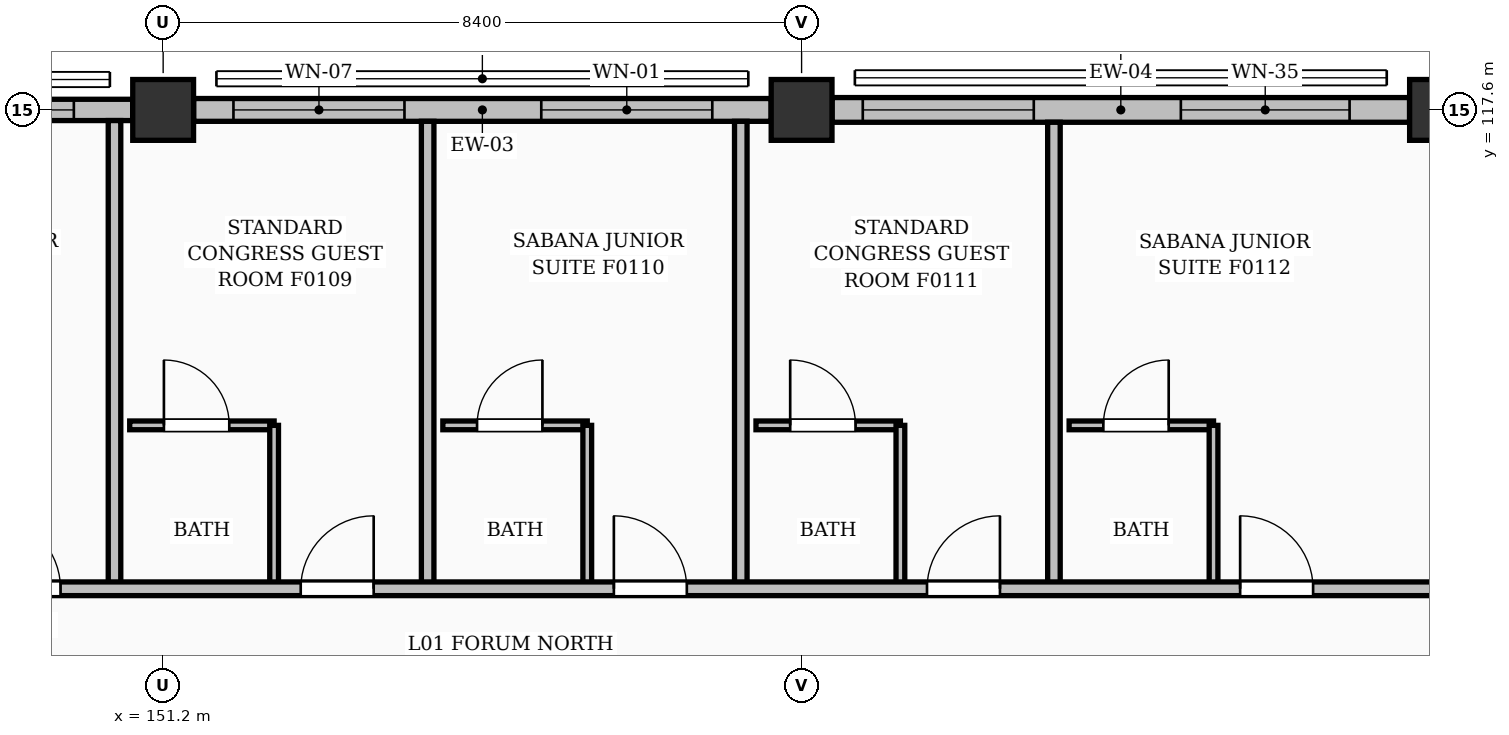
"""IFC4 building model, lengths in metres.
Left out: names, types, materials, properties, quantities, classifications, styles, units other than length and angle.
Written with IfcOpenShell. Run it as: python <this file> out.ifc"""

import sys

from ifc_helpers import new_model, si_unit, direction, frame, frame_2d, origin, origin_2d, place, context, subcontext, project, spatial, rectangle, extrude, element, fill, save


model = new_model("IFC4")
c1 = context("Model", 3, precision=1e-05, world=origin(), true_north=direction((0.0, 1.0)))
c2 = subcontext(c1, "Body", "Model", "MODEL_VIEW")
j1 = project(units=[si_unit("LENGTHUNIT", "METRE"), si_unit("PLANEANGLEUNIT", "RADIAN")], contexts=[c1])
p1 = place(None, origin())
s1 = spatial("IfcSite", under=j1, at=p1, CompositionType="ELEMENT")
p2 = place(p1, origin())
s2 = spatial("IfcBuilding", under=s1, at=p2, CompositionType="ELEMENT")
p3 = place(p2, frame((0.0, 0.0, 3.92)))
s3 = spatial("IfcBuildingStorey", under=s2, at=p3, CompositionType="ELEMENT", Elevation=3.92)
for number, where, z_axis, x_axis in (
    (1, (151.2, 117.6, 0.0), (0.0, 0.0, 1.0), (1.0, 0.0, 0.0)),
    (2, (159.6, 117.6, 0.0), (0.0, 0.0, 1.0), (1.0, 0.0, 0.0)),
    (3, (168.0, 117.6, 0.0), (0.0, 0.0, 1.0), (1.0, 0.0, 0.0)),
):
    element("IfcColumn", number, at=place(p3, frame(where, z_axis=z_axis, x_axis=x_axis)), inside=s3, PredefinedType="COLUMN", context=c2, shape_type="SweptSolid", body=[
        extrude(rectangle(XDim=0.8, YDim=0.8, at=origin_2d()), origin(), (0.0, 0.0, 1.0), 3.64),
    ])
p4 = place(p3, frame((143.201, 117.6, 0.0), z_axis=(0.0, 0.0, 1.0), x_axis=(1.0, 0.0, 0.0)))
e4 = element("IfcWall", 4, at=p4, inside=s3, PredefinedType="SOLIDWALL", context=c2, shape_type="SweptSolid", body=[
    extrude(rectangle(XDim=7.598, YDim=0.28, at=frame_2d((3.799, 0.0))), origin(), (0.0, 0.0, 1.0), 2.445),
])
p5 = place(p4, frame((0.539, 0.0, 0.25)))
e5 = element("IfcOpeningElement", 5, at=p5, cuts=e4, PredefinedType="OPENING", context=c2, shape_type="SweptSolid", body=[
    extrude(rectangle(XDim=2.22, YDim=1.9, at=frame_2d((1.11, 0.95))), frame((0.0, 0.15, 0.0), z_axis=(0.0, -1.0, 0.0), x_axis=(1.0, 0.0, 0.0)), (0.0, 0.0, 1.0), 0.3),
])
p6 = place(p4, frame((4.574, 0.0, 0.25)))
e6 = element("IfcOpeningElement", 6, at=p6, cuts=e4, PredefinedType="OPENING", context=c2, shape_type="SweptSolid", body=[
    extrude(rectangle(XDim=2.25, YDim=1.95, at=frame_2d((1.125, 0.975))), frame((0.0, 0.15, 0.0), z_axis=(0.0, -1.0, 0.0), x_axis=(1.0, 0.0, 0.0)), (0.0, 0.0, 1.0), 0.3),
])
p7 = place(p3, frame((151.601, 117.6, 0.0), z_axis=(0.0, 0.0, 1.0), x_axis=(1.0, 0.0, 0.0)))
e7 = element("IfcWall", 7, at=p7, inside=s3, PredefinedType="SOLIDWALL", context=c2, shape_type="SweptSolid", body=[
    extrude(rectangle(XDim=7.598, YDim=0.3, at=frame_2d((3.799, 0.0))), origin(), (0.0, 0.0, 1.0), 2.445),
])
p8 = place(p7, frame((0.524, 0.0, 0.25)))
e8 = element("IfcOpeningElement", 8, at=p8, cuts=e7, PredefinedType="OPENING", context=c2, shape_type="SweptSolid", body=[
    extrude(rectangle(XDim=2.25, YDim=1.95, at=frame_2d((1.125, 0.975))), frame((0.0, 0.16, 0.0), z_axis=(0.0, -1.0, 0.0), x_axis=(1.0, 0.0, 0.0)), (0.0, 0.0, 1.0), 0.32),
])
p9 = place(p7, frame((4.574, 0.0, 0.25)))
e9 = element("IfcOpeningElement", 9, at=p9, cuts=e7, PredefinedType="OPENING", context=c2, shape_type="SweptSolid", body=[
    extrude(rectangle(XDim=2.25, YDim=1.85, at=frame_2d((1.125, 0.925))), frame((0.0, 0.16, 0.0), z_axis=(0.0, -1.0, 0.0), x_axis=(1.0, 0.0, 0.0)), (0.0, 0.0, 1.0), 0.32),
])
p10 = place(p3, frame((160.001, 117.6, 0.0), z_axis=(0.0, 0.0, 1.0), x_axis=(1.0, 0.0, 0.0)))
e10 = element("IfcWall", 10, at=p10, inside=s3, PredefinedType="SOLIDWALL", context=c2, shape_type="SweptSolid", body=[
    extrude(rectangle(XDim=7.598, YDim=0.325, at=frame_2d((3.799, 0.0))), origin(), (0.0, 0.0, 1.0), 2.445),
])
p11 = place(p10, frame((0.404, 0.0, 0.25)))
e11 = element("IfcOpeningElement", 11, at=p11, cuts=e10, PredefinedType="OPENING", context=c2, shape_type="SweptSolid", body=[
    extrude(rectangle(XDim=2.25, YDim=1.85, at=frame_2d((1.125, 0.925))), frame((0.0, 0.172, 0.0), z_axis=(0.0, -1.0, 0.0), x_axis=(1.0, 0.0, 0.0)), (0.0, 0.0, 1.0), 0.345),
])
p12 = place(p10, frame((4.589, 0.0, 0.25)))
e12 = element("IfcOpeningElement", 12, at=p12, cuts=e10, PredefinedType="OPENING", context=c2, shape_type="SweptSolid", body=[
    extrude(rectangle(XDim=2.22, YDim=1.9, at=frame_2d((1.11, 0.95))), frame((0.0, 0.172, 0.0), z_axis=(0.0, -1.0, 0.0), x_axis=(1.0, 0.0, 0.0)), (0.0, 0.0, 1.0), 0.345),
])
p13 = place(p3, frame((150.76, 113.45, 0.0), z_axis=(0.0, 0.0, 1.0), x_axis=(1.0, 0.0, 0.0)))
e13 = element("IfcWall", 13, at=p13, inside=s3, PredefinedType="PARTITIONING", context=c2, shape_type="SweptSolid", body=[
    extrude(rectangle(XDim=1.9, YDim=0.115, at=frame_2d((0.95, 0.0))), origin(), (0.0, 0.0, 1.0), 3.36),
])
p14 = place(p13, frame((0.45, 0.0, 0.0)))
e14 = element("IfcOpeningElement", 14, at=p14, cuts=e13, PredefinedType="OPENING", context=c2, shape_type="SweptSolid", body=[
    extrude(rectangle(XDim=0.86, YDim=2.05, at=frame_2d((0.43, 1.025))), frame((0.0, 0.067, 0.0), z_axis=(0.0, -1.0, 0.0), x_axis=(1.0, 0.0, 0.0)), (0.0, 0.0, 1.0), 0.135),
])
p15 = place(p3, frame((152.66, 111.3, 0.0), z_axis=(0.0, 0.0, 1.0), x_axis=(0.0, 1.0, 0.0)))
e15 = element("IfcWall", 15, at=p15, inside=s3, PredefinedType="PARTITIONING", context=c2, shape_type="SweptSolid", body=[
    extrude(rectangle(XDim=2.15, YDim=0.115, at=frame_2d((1.075, 0.0))), origin(), (0.0, 0.0, 1.0), 3.36),
])
p16 = place(p3, frame((150.56, 111.3, 0.0), z_axis=(0.0, 0.0, 1.0), x_axis=(0.0, 1.0, 0.0)))
e16 = element("IfcWall", 16, at=p16, inside=s3, PredefinedType="PARTITIONING", context=c2, shape_type="SweptSolid", body=[
    extrude(rectangle(XDim=6.16, YDim=0.165, at=frame_2d((3.08, 0.0))), origin(), (0.0, 0.0, 1.0), 3.36),
])
p17 = place(p3, frame((154.88, 113.45, 0.0), z_axis=(0.0, 0.0, 1.0), x_axis=(1.0, 0.0, 0.0)))
e17 = element("IfcWall", 17, at=p17, inside=s3, PredefinedType="PARTITIONING", context=c2, shape_type="SweptSolid", body=[
    extrude(rectangle(XDim=1.9, YDim=0.115, at=frame_2d((0.95, 0.0))), origin(), (0.0, 0.0, 1.0), 3.36),
])
p18 = place(p17, frame((0.45, 0.0, 0.0)))
e18 = element("IfcOpeningElement", 18, at=p18, cuts=e17, PredefinedType="OPENING", context=c2, shape_type="SweptSolid", body=[
    extrude(rectangle(XDim=0.86, YDim=2.05, at=frame_2d((0.43, 1.025))), frame((0.0, 0.067, 0.0), z_axis=(0.0, -1.0, 0.0), x_axis=(1.0, 0.0, 0.0)), (0.0, 0.0, 1.0), 0.135),
])
p19 = place(p3, frame((156.78, 111.3, 0.0), z_axis=(0.0, 0.0, 1.0), x_axis=(0.0, 1.0, 0.0)))
e19 = element("IfcWall", 19, at=p19, inside=s3, PredefinedType="PARTITIONING", context=c2, shape_type="SweptSolid", body=[
    extrude(rectangle(XDim=2.15, YDim=0.115, at=frame_2d((1.075, 0.0))), origin(), (0.0, 0.0, 1.0), 3.042),
])
p20 = place(p3, frame((154.68, 111.3, 0.0), z_axis=(0.0, 0.0, 1.0), x_axis=(0.0, 1.0, 0.0)))
e20 = element("IfcWall", 20, at=p20, inside=s3, PredefinedType="PARTITIONING", context=c2, shape_type="SweptSolid", body=[
    extrude(rectangle(XDim=6.15, YDim=0.165, at=frame_2d((3.075, 0.0))), origin(), (0.0, 0.0, 1.0), 3.36),
])
p21 = place(p3, frame((159.0, 113.45, 0.0), z_axis=(0.0, 0.0, 1.0), x_axis=(1.0, 0.0, 0.0)))
e21 = element("IfcWall", 21, at=p21, inside=s3, PredefinedType="PARTITIONING", context=c2, shape_type="SweptSolid", body=[
    extrude(rectangle(XDim=1.9, YDim=0.115, at=frame_2d((0.95, 0.0))), origin(), (0.0, 0.0, 1.0), 3.36),
])
p22 = place(p21, frame((0.45, 0.0, 0.0)))
e22 = element("IfcOpeningElement", 22, at=p22, cuts=e21, PredefinedType="OPENING", context=c2, shape_type="SweptSolid", body=[
    extrude(rectangle(XDim=0.86, YDim=2.05, at=frame_2d((0.43, 1.025))), frame((0.0, 0.067, 0.0), z_axis=(0.0, -1.0, 0.0), x_axis=(1.0, 0.0, 0.0)), (0.0, 0.0, 1.0), 0.135),
])
p23 = place(p3, frame((160.9, 111.3, 0.0), z_axis=(0.0, 0.0, 1.0), x_axis=(0.0, 1.0, 0.0)))
e23 = element("IfcWall", 23, at=p23, inside=s3, PredefinedType="PARTITIONING", context=c2, shape_type="SweptSolid", body=[
    extrude(rectangle(XDim=2.15, YDim=0.115, at=frame_2d((1.075, 0.0))), origin(), (0.0, 0.0, 1.0), 3.36),
])
p24 = place(p3, frame((158.8, 111.3, 0.0), z_axis=(0.0, 0.0, 1.0), x_axis=(0.0, 1.0, 0.0)))
e24 = element("IfcWall", 24, at=p24, inside=s3, PredefinedType="PARTITIONING", context=c2, shape_type="SweptSolid", body=[
    extrude(rectangle(XDim=6.15, YDim=0.165, at=frame_2d((3.075, 0.0))), origin(), (0.0, 0.0, 1.0), 3.36),
])
p25 = place(p3, frame((163.12, 113.45, 0.0), z_axis=(0.0, 0.0, 1.0), x_axis=(1.0, 0.0, 0.0)))
e25 = element("IfcWall", 25, at=p25, inside=s3, PredefinedType="PARTITIONING", context=c2, shape_type="SweptSolid", body=[
    extrude(rectangle(XDim=1.9, YDim=0.115, at=frame_2d((0.95, 0.0))), origin(), (0.0, 0.0, 1.0), 3.36),
])
p26 = place(p25, frame((0.45, 0.0, 0.0)))
e26 = element("IfcOpeningElement", 26, at=p26, cuts=e25, PredefinedType="OPENING", context=c2, shape_type="SweptSolid", body=[
    extrude(rectangle(XDim=0.86, YDim=2.05, at=frame_2d((0.43, 1.025))), frame((0.0, 0.067, 0.0), z_axis=(0.0, -1.0, 0.0), x_axis=(1.0, 0.0, 0.0)), (0.0, 0.0, 1.0), 0.135),
])
p27 = place(p3, frame((165.02, 111.3, 0.0), z_axis=(0.0, 0.0, 1.0), x_axis=(0.0, 1.0, 0.0)))
e27 = element("IfcWall", 27, at=p27, inside=s3, PredefinedType="PARTITIONING", context=c2, shape_type="SweptSolid", body=[
    extrude(rectangle(XDim=2.15, YDim=0.115, at=frame_2d((1.075, 0.0))), origin(), (0.0, 0.0, 1.0), 3.36),
])
p28 = place(p3, frame((162.92, 111.3, 0.0), z_axis=(0.0, 0.0, 1.0), x_axis=(0.0, 1.0, 0.0)))
e28 = element("IfcWall", 28, at=p28, inside=s3, PredefinedType="PARTITIONING", context=c2, shape_type="SweptSolid", body=[
    extrude(rectangle(XDim=6.137, YDim=0.165, at=frame_2d((3.069, 0.0))), origin(), (0.0, 0.0, 1.0), 3.36),
])
p29 = place(p3, frame((117.6, 111.3, 0.0), z_axis=(0.0, 0.0, 1.0), x_axis=(1.0, 0.0, 0.0)))
e29 = element("IfcWall", 29, at=p29, inside=s3, PredefinedType="PARTITIONING", context=c2, shape_type="SweptSolid", body=[
    extrude(rectangle(XDim=50.32, YDim=0.18, at=frame_2d((25.16, 0.0))), origin(), (0.0, 0.0, 1.0), 3.36),
])
p30 = place(p29, frame((2.45, 0.0, 0.0)))
e30 = element("IfcOpeningElement", 30, at=p30, cuts=e29, PredefinedType="OPENING", context=c2, shape_type="SweptSolid", body=[
    extrude(rectangle(XDim=0.96, YDim=2.15, at=frame_2d((0.48, 1.075))), frame((0.0, 0.1, 0.0), z_axis=(0.0, -1.0, 0.0), x_axis=(1.0, 0.0, 0.0)), (0.0, 0.0, 1.0), 0.2),
])
p31 = place(p29, frame((6.57, 0.0, 0.0)))
e31 = element("IfcOpeningElement", 31, at=p31, cuts=e29, PredefinedType="OPENING", context=c2, shape_type="SweptSolid", body=[
    extrude(rectangle(XDim=0.96, YDim=2.15, at=frame_2d((0.48, 1.075))), frame((0.0, 0.1, 0.0), z_axis=(0.0, -1.0, 0.0), x_axis=(1.0, 0.0, 0.0)), (0.0, 0.0, 1.0), 0.2),
])
p32 = place(p29, frame((10.69, 0.0, 0.0)))
e32 = element("IfcOpeningElement", 32, at=p32, cuts=e29, PredefinedType="OPENING", context=c2, shape_type="SweptSolid", body=[
    extrude(rectangle(XDim=0.96, YDim=2.15, at=frame_2d((0.48, 1.075))), frame((0.0, 0.1, 0.0), z_axis=(0.0, -1.0, 0.0), x_axis=(1.0, 0.0, 0.0)), (0.0, 0.0, 1.0), 0.2),
])
p33 = place(p29, frame((14.81, 0.0, 0.0)))
e33 = element("IfcOpeningElement", 33, at=p33, cuts=e29, PredefinedType="OPENING", context=c2, shape_type="SweptSolid", body=[
    extrude(rectangle(XDim=0.96, YDim=2.15, at=frame_2d((0.48, 1.075))), frame((0.0, 0.1, 0.0), z_axis=(0.0, -1.0, 0.0), x_axis=(1.0, 0.0, 0.0)), (0.0, 0.0, 1.0), 0.2),
])
p34 = place(p29, frame((18.93, 0.0, 0.0)))
e34 = element("IfcOpeningElement", 34, at=p34, cuts=e29, PredefinedType="OPENING", context=c2, shape_type="SweptSolid", body=[
    extrude(rectangle(XDim=0.96, YDim=2.15, at=frame_2d((0.48, 1.075))), frame((0.0, 0.1, 0.0), z_axis=(0.0, -1.0, 0.0), x_axis=(1.0, 0.0, 0.0)), (0.0, 0.0, 1.0), 0.2),
])
p35 = place(p29, frame((23.05, 0.0, 0.0)))
e35 = element("IfcOpeningElement", 35, at=p35, cuts=e29, PredefinedType="OPENING", context=c2, shape_type="SweptSolid", body=[
    extrude(rectangle(XDim=0.96, YDim=2.15, at=frame_2d((0.48, 1.075))), frame((0.0, 0.1, 0.0), z_axis=(0.0, -1.0, 0.0), x_axis=(1.0, 0.0, 0.0)), (0.0, 0.0, 1.0), 0.2),
])
p36 = place(p29, frame((27.17, 0.0, 0.0)))
e36 = element("IfcOpeningElement", 36, at=p36, cuts=e29, PredefinedType="OPENING", context=c2, shape_type="SweptSolid", body=[
    extrude(rectangle(XDim=0.96, YDim=2.15, at=frame_2d((0.48, 1.075))), frame((0.0, 0.1, 0.0), z_axis=(0.0, -1.0, 0.0), x_axis=(1.0, 0.0, 0.0)), (0.0, 0.0, 1.0), 0.2),
])
p37 = place(p29, frame((31.29, 0.0, 0.0)))
e37 = element("IfcOpeningElement", 37, at=p37, cuts=e29, PredefinedType="OPENING", context=c2, shape_type="SweptSolid", body=[
    extrude(rectangle(XDim=0.96, YDim=2.15, at=frame_2d((0.48, 1.075))), frame((0.0, 0.1, 0.0), z_axis=(0.0, -1.0, 0.0), x_axis=(1.0, 0.0, 0.0)), (0.0, 0.0, 1.0), 0.2),
])
p38 = place(p29, frame((35.41, 0.0, 0.0)))
e38 = element("IfcOpeningElement", 38, at=p38, cuts=e29, PredefinedType="OPENING", context=c2, shape_type="SweptSolid", body=[
    extrude(rectangle(XDim=0.96, YDim=2.15, at=frame_2d((0.48, 1.075))), frame((0.0, 0.1, 0.0), z_axis=(0.0, -1.0, 0.0), x_axis=(1.0, 0.0, 0.0)), (0.0, 0.0, 1.0), 0.2),
])
p39 = place(p29, frame((39.53, 0.0, 0.0)))
e39 = element("IfcOpeningElement", 39, at=p39, cuts=e29, PredefinedType="OPENING", context=c2, shape_type="SweptSolid", body=[
    extrude(rectangle(XDim=0.96, YDim=2.15, at=frame_2d((0.48, 1.075))), frame((0.0, 0.1, 0.0), z_axis=(0.0, -1.0, 0.0), x_axis=(1.0, 0.0, 0.0)), (0.0, 0.0, 1.0), 0.2),
])
p40 = place(p29, frame((43.65, 0.0, 0.0)))
e40 = element("IfcOpeningElement", 40, at=p40, cuts=e29, PredefinedType="OPENING", context=c2, shape_type="SweptSolid", body=[
    extrude(rectangle(XDim=0.96, YDim=2.15, at=frame_2d((0.48, 1.075))), frame((0.0, 0.1, 0.0), z_axis=(0.0, -1.0, 0.0), x_axis=(1.0, 0.0, 0.0)), (0.0, 0.0, 1.0), 0.2),
])
p41 = place(p29, frame((47.77, 0.0, 0.0)))
e41 = element("IfcOpeningElement", 41, at=p41, cuts=e29, PredefinedType="OPENING", context=c2, shape_type="SweptSolid", body=[
    extrude(rectangle(XDim=0.96, YDim=2.15, at=frame_2d((0.48, 1.075))), frame((0.0, 0.1, 0.0), z_axis=(0.0, -1.0, 0.0), x_axis=(1.0, 0.0, 0.0)), (0.0, 0.0, 1.0), 0.2),
])
p42 = place(p6, origin())
e42 = element("IfcWindow", 42, at=p42, inside=s3, PartitioningType="DOUBLE_PANEL_VERTICAL", PredefinedType="WINDOW", context=c2, shape_type="SweptSolid", body=[
    extrude(rectangle(XDim=2.25, YDim=1.95, at=frame_2d((1.125, 0.975))), frame((0.0, 0.03, 0.0), z_axis=(0.0, -1.0, 0.0), x_axis=(1.0, 0.0, 0.0)), (0.0, 0.0, 1.0), 0.06),
])
fill(e6, e42)
p43 = place(p8, origin())
e43 = element("IfcWindow", 43, at=p43, inside=s3, PartitioningType="DOUBLE_PANEL_VERTICAL", PredefinedType="WINDOW", context=c2, shape_type="SweptSolid", body=[
    extrude(rectangle(XDim=2.25, YDim=1.95, at=frame_2d((1.125, 0.975))), frame((0.0, 0.03, 0.0), z_axis=(0.0, -1.0, 0.0), x_axis=(1.0, 0.0, 0.0)), (0.0, 0.0, 1.0), 0.06),
])
fill(e8, e43)
p44 = place(p9, origin())
e44 = element("IfcWindow", 44, at=p44, inside=s3, PartitioningType="DOUBLE_PANEL_VERTICAL", PredefinedType="WINDOW", context=c2, shape_type="SweptSolid", body=[
    extrude(rectangle(XDim=2.25, YDim=1.85, at=frame_2d((1.125, 0.925))), frame((0.0, 0.03, 0.0), z_axis=(0.0, -1.0, 0.0), x_axis=(1.0, 0.0, 0.0)), (0.0, 0.0, 1.0), 0.06),
])
fill(e9, e44)
p45 = place(p11, origin())
e45 = element("IfcWindow", 45, at=p45, inside=s3, PartitioningType="DOUBLE_PANEL_VERTICAL", PredefinedType="WINDOW", context=c2, shape_type="SweptSolid", body=[
    extrude(rectangle(XDim=2.25, YDim=1.85, at=frame_2d((1.125, 0.925))), frame((0.0, 0.03, 0.0), z_axis=(0.0, -1.0, 0.0), x_axis=(1.0, 0.0, 0.0)), (0.0, 0.0, 1.0), 0.06),
])
fill(e11, e45)
p46 = place(p12, origin())
e46 = element("IfcWindow", 46, at=p46, inside=s3, PartitioningType="DOUBLE_PANEL_VERTICAL", PredefinedType="WINDOW", context=c2, shape_type="SweptSolid", body=[
    extrude(rectangle(XDim=2.22, YDim=1.9, at=frame_2d((1.11, 0.95))), frame((0.0, 0.03, 0.0), z_axis=(0.0, -1.0, 0.0), x_axis=(1.0, 0.0, 0.0)), (0.0, 0.0, 1.0), 0.06),
])
fill(e12, e46)
p47 = place(p14, origin())
e47 = element("IfcDoor", 47, at=p47, inside=s3, OperationType="SINGLE_SWING_LEFT", PredefinedType="DOOR", context=c2, shape_type="SweptSolid", body=[
    extrude(rectangle(XDim=0.86, YDim=2.05, at=frame_2d((0.43, 1.025))), frame((0.0, 0.025, 0.0), z_axis=(0.0, -1.0, 0.0), x_axis=(1.0, 0.0, 0.0)), (0.0, 0.0, 1.0), 0.05),
])
fill(e14, e47)
p48 = place(p18, origin())
e48 = element("IfcDoor", 48, at=p48, inside=s3, OperationType="SINGLE_SWING_RIGHT", PredefinedType="DOOR", context=c2, shape_type="SweptSolid", body=[
    extrude(rectangle(XDim=0.86, YDim=2.05, at=frame_2d((0.43, 1.025))), frame((0.0, 0.025, 0.0), z_axis=(0.0, -1.0, 0.0), x_axis=(1.0, 0.0, 0.0)), (0.0, 0.0, 1.0), 0.05),
])
fill(e18, e48)
p49 = place(p22, origin())
e49 = element("IfcDoor", 49, at=p49, inside=s3, OperationType="SINGLE_SWING_LEFT", PredefinedType="DOOR", context=c2, shape_type="SweptSolid", body=[
    extrude(rectangle(XDim=0.86, YDim=2.05, at=frame_2d((0.43, 1.025))), frame((0.0, 0.025, 0.0), z_axis=(0.0, -1.0, 0.0), x_axis=(1.0, 0.0, 0.0)), (0.0, 0.0, 1.0), 0.05),
])
fill(e22, e49)
p50 = place(p26, origin())
e50 = element("IfcDoor", 50, at=p50, inside=s3, OperationType="SINGLE_SWING_RIGHT", PredefinedType="DOOR", context=c2, shape_type="SweptSolid", body=[
    extrude(rectangle(XDim=0.86, YDim=2.05, at=frame_2d((0.43, 1.025))), frame((0.0, 0.025, 0.0), z_axis=(0.0, -1.0, 0.0), x_axis=(1.0, 0.0, 0.0)), (0.0, 0.0, 1.0), 0.05),
])
fill(e26, e50)
p51 = place(p37, origin())
e51 = element("IfcDoor", 51, at=p51, inside=s3, OperationType="SINGLE_SWING_LEFT", PredefinedType="DOOR", context=c2, shape_type="SweptSolid", body=[
    extrude(rectangle(XDim=0.96, YDim=2.15, at=frame_2d((0.48, 1.075))), frame((0.0, 0.025, 0.0), z_axis=(0.0, -1.0, 0.0), x_axis=(1.0, 0.0, 0.0)), (0.0, 0.0, 1.0), 0.05),
])
fill(e37, e51)
p52 = place(p38, origin())
e52 = element("IfcDoor", 52, at=p52, inside=s3, OperationType="SINGLE_SWING_RIGHT", PredefinedType="DOOR", context=c2, shape_type="SweptSolid", body=[
    extrude(rectangle(XDim=0.96, YDim=2.15, at=frame_2d((0.48, 1.075))), frame((0.0, 0.025, 0.0), z_axis=(0.0, -1.0, 0.0), x_axis=(1.0, 0.0, 0.0)), (0.0, 0.0, 1.0), 0.05),
])
fill(e38, e52)
p53 = place(p39, origin())
e53 = element("IfcDoor", 53, at=p53, inside=s3, OperationType="SINGLE_SWING_LEFT", PredefinedType="DOOR", context=c2, shape_type="SweptSolid", body=[
    extrude(rectangle(XDim=0.96, YDim=2.15, at=frame_2d((0.48, 1.075))), frame((0.0, 0.025, 0.0), z_axis=(0.0, -1.0, 0.0), x_axis=(1.0, 0.0, 0.0)), (0.0, 0.0, 1.0), 0.05),
])
fill(e39, e53)
p54 = place(p40, origin())
e54 = element("IfcDoor", 54, at=p54, inside=s3, OperationType="SINGLE_SWING_RIGHT", PredefinedType="DOOR", context=c2, shape_type="SweptSolid", body=[
    extrude(rectangle(XDim=0.96, YDim=2.15, at=frame_2d((0.48, 1.075))), frame((0.0, 0.025, 0.0), z_axis=(0.0, -1.0, 0.0), x_axis=(1.0, 0.0, 0.0)), (0.0, 0.0, 1.0), 0.05),
])
fill(e40, e54)
p55 = place(p41, origin())
e55 = element("IfcDoor", 55, at=p55, inside=s3, OperationType="SINGLE_SWING_LEFT", PredefinedType="DOOR", context=c2, shape_type="SweptSolid", body=[
    extrude(rectangle(XDim=0.96, YDim=2.15, at=frame_2d((0.48, 1.075))), frame((0.0, 0.025, 0.0), z_axis=(0.0, -1.0, 0.0), x_axis=(1.0, 0.0, 0.0)), (0.0, 0.0, 1.0), 0.05),
])
fill(e41, e55)
save(model, sys.argv[1])
